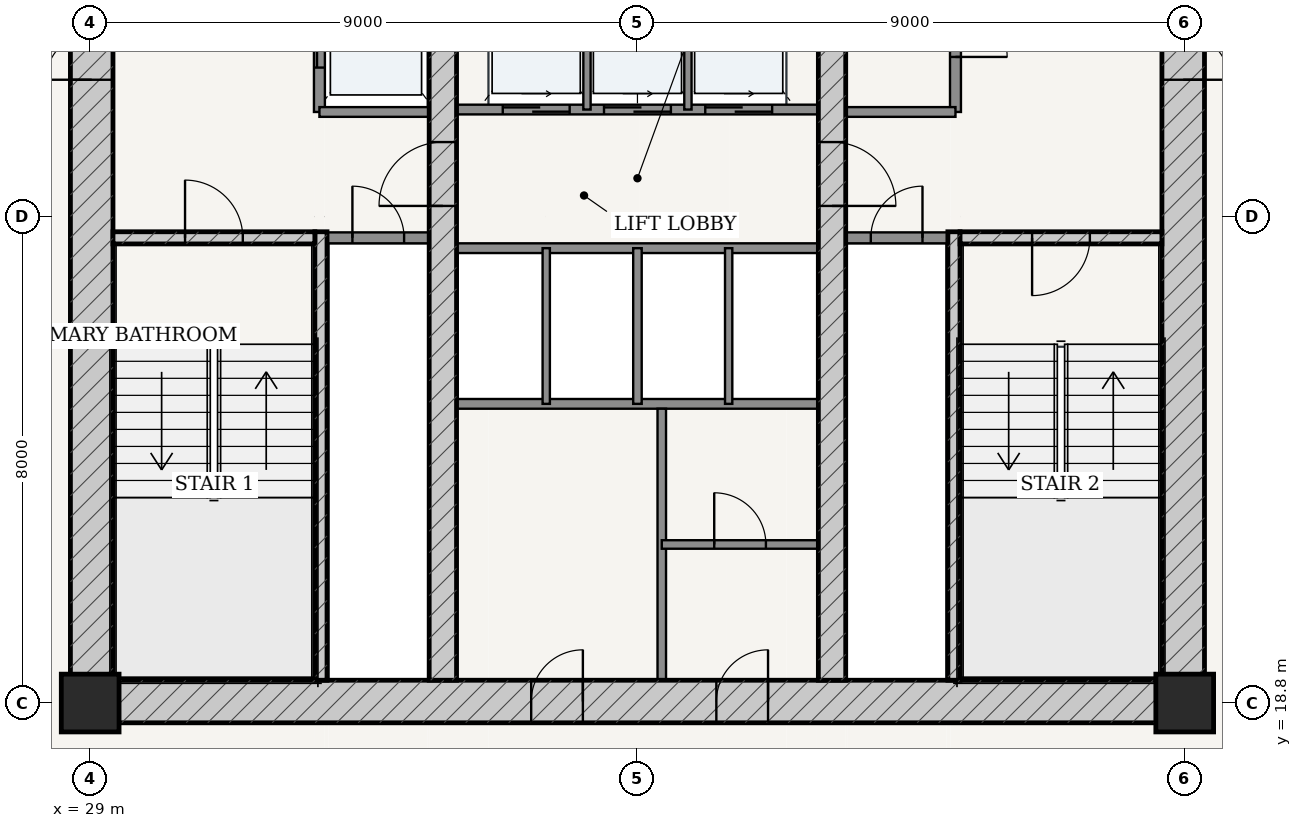
"""IFC4 building model, lengths in metres.
Left out: names, types, materials, properties, quantities, classifications, styles, units other than length and angle.
Written with IfcOpenShell. Run it as: python <this file> out.ifc"""

import sys

from ifc_helpers import new_model, si_unit, direction, frame, frame_2d, origin, origin_2d, place, context, subcontext, project, spatial, rectangle, extrude, source, transform, mapped, element, fill, save


model = new_model("IFC4")
c1 = context("Model", 3, precision=1e-05, world=origin(), true_north=direction((-0.2419218956, 0.970295726276)))
c2 = subcontext(c1, "Body", "Model", "MODEL_VIEW")
j1 = project(units=[si_unit("LENGTHUNIT", "METRE"), si_unit("PLANEANGLEUNIT", "RADIAN")], contexts=[c1])
p1 = place(None, origin())
s1 = spatial("IfcSite", under=j1, at=p1, CompositionType="ELEMENT")
p2 = place(p1, origin())
s2 = spatial("IfcBuilding", under=s1, at=p2, CompositionType="ELEMENT")
p3 = place(p2, frame((0.0, 0.0, 115.8)))
s3 = spatial("IfcBuildingStorey", under=s2, at=p3, CompositionType="ELEMENT", Elevation=115.8)
for number, where, z_axis, x_axis in (
    (1, (29.0, 18.8, 0.0), (0.0, 0.0, 1.0), (1.0, 0.0, 0.0)),
    (2, (47.0, 18.8, 0.0), (0.0, 0.0, 1.0), (1.0, 0.0, 0.0)),
):
    element("IfcColumn", number, at=place(p3, frame(where, z_axis=z_axis, x_axis=x_axis)), inside=s3, PredefinedType="COLUMN", context=c2, shape_type="SweptSolid", body=[
        extrude(rectangle(XDim=0.95, YDim=0.95, at=origin_2d()), origin(), (0.0, 0.0, 1.0), 3.6),
    ])
p4 = place(p3, frame((28.675, 18.825, 0.0), z_axis=(0.0, 0.0, 1.0), x_axis=(1.0, 0.0, 0.0)))
e3 = element("IfcWall", 3, at=p4, inside=s3, PredefinedType="SHEAR", context=c2, shape_type="SweptSolid", body=[
    extrude(rectangle(XDim=18.65, YDim=0.7, at=frame_2d((9.325, 0.0))), origin(), (0.0, 0.0, 1.0), 3.325),
])
p5 = place(p4, frame((7.577, 0.0, 0.0)))
e4 = element("IfcOpeningElement", 4, at=p5, cuts=e3, PredefinedType="OPENING", context=c2, shape_type="SweptSolid", body=[
    extrude(rectangle(XDim=0.85, YDim=2.1, at=frame_2d((0.425, 1.05))), frame((0.0, 0.36, 0.0), z_axis=(0.0, -1.0, 0.0), x_axis=(1.0, 0.0, 0.0)), (0.0, 0.0, 1.0), 0.72),
])
p6 = place(p4, frame((10.623, 0.0, 0.0)))
e5 = element("IfcOpeningElement", 5, at=p6, cuts=e3, PredefinedType="OPENING", context=c2, shape_type="SweptSolid", body=[
    extrude(rectangle(XDim=0.85, YDim=2.1, at=frame_2d((0.425, 1.05))), frame((0.0, 0.36, 0.0), z_axis=(0.0, -1.0, 0.0), x_axis=(1.0, 0.0, 0.0)), (0.0, 0.0, 1.0), 0.72),
])
p7 = place(p3, frame((29.025, 19.175, 0.0), z_axis=(0.0, 0.0, 1.0), x_axis=(0.0, 1.0, 0.0)))
e6 = element("IfcWall", 6, at=p7, inside=s3, PredefinedType="SHEAR", context=c2, shape_type="SweptSolid", body=[
    extrude(rectangle(XDim=15.25, YDim=0.7, at=frame_2d((7.625, 0.0))), origin(), (0.0, 0.0, 1.0), 3.325),
])
p8 = place(p7, frame((9.875, 0.0, 0.0)))
e7 = element("IfcOpeningElement", 7, at=p8, cuts=e6, PredefinedType="OPENING", context=c2, shape_type="SweptSolid", body=[
    extrude(rectangle(XDim=1.5, YDim=2.2, at=frame_2d((0.75, 1.1))), frame((0.0, 0.36, 0.0), z_axis=(0.0, -1.0, 0.0), x_axis=(1.0, 0.0, 0.0)), (0.0, 0.0, 1.0), 0.72),
])
p9 = place(p3, frame((46.975, 19.175, 0.0), z_axis=(0.0, 0.0, 1.0), x_axis=(0.0, 1.0, 0.0)))
e8 = element("IfcWall", 8, at=p9, inside=s3, PredefinedType="SHEAR", context=c2, shape_type="SweptSolid", body=[
    extrude(rectangle(XDim=15.25, YDim=0.7, at=frame_2d((7.625, 0.0))), origin(), (0.0, 0.0, 1.0), 3.325),
])
p10 = place(p9, frame((9.875, 0.0, 0.0)))
e9 = element("IfcOpeningElement", 9, at=p10, cuts=e8, PredefinedType="OPENING", context=c2, shape_type="SweptSolid", body=[
    extrude(rectangle(XDim=1.5, YDim=2.2, at=frame_2d((0.75, 1.1))), frame((0.0, 0.36, 0.0), z_axis=(0.0, -1.0, 0.0), x_axis=(1.0, 0.0, 0.0)), (0.0, 0.0, 1.0), 0.72),
])
p11 = place(p3, frame((32.795, 19.175, 0.0), z_axis=(0.0, 0.0, 1.0), x_axis=(0.0, 1.0, 0.0)))
e10 = element("IfcWall", 10, at=p11, inside=s3, PredefinedType="SOLIDWALL", context=c2, shape_type="SweptSolid", body=[
    extrude(rectangle(XDim=7.375, YDim=0.2, at=frame_2d((3.688, 0.0))), origin(), (0.0, 0.0, 1.0), 3.325),
])
p12 = place(p3, frame((29.375, 26.45, 0.0), z_axis=(0.0, 0.0, 1.0), x_axis=(1.0, 0.0, 0.0)))
e11 = element("IfcWall", 11, at=p12, inside=s3, PredefinedType="SOLIDWALL", context=c2, shape_type="SweptSolid", body=[
    extrude(rectangle(XDim=3.32, YDim=0.2, at=frame_2d((1.66, 0.0))), origin(), (0.0, 0.0, 1.0), 3.325),
])
p13 = place(p12, frame((1.185, 0.0, 0.0)))
e12 = element("IfcOpeningElement", 12, at=p13, cuts=e11, PredefinedType="OPENING", context=c2, shape_type="SweptSolid", body=[
    extrude(rectangle(XDim=0.95, YDim=2.15, at=frame_2d((0.475, 1.075))), frame((0.0, 0.11, 0.0), z_axis=(0.0, -1.0, 0.0), x_axis=(1.0, 0.0, 0.0)), (0.0, 0.0, 1.0), 0.22),
])
p14 = place(p3, frame((43.205, 19.175, 0.0), z_axis=(0.0, 0.0, 1.0), x_axis=(0.0, 1.0, 0.0)))
e13 = element("IfcWall", 13, at=p14, inside=s3, PredefinedType="SOLIDWALL", context=c2, shape_type="SweptSolid", body=[
    extrude(rectangle(XDim=7.375, YDim=0.2, at=frame_2d((3.688, 0.0))), origin(), (0.0, 0.0, 1.0), 3.325),
])
p15 = place(p3, frame((43.305, 26.45, 0.0), z_axis=(0.0, 0.0, 1.0), x_axis=(1.0, 0.0, 0.0)))
e14 = element("IfcWall", 14, at=p15, inside=s3, PredefinedType="SOLIDWALL", context=c2, shape_type="SweptSolid", body=[
    extrude(rectangle(XDim=3.32, YDim=0.2, at=frame_2d((1.66, 0.0))), origin(), (0.0, 0.0, 1.0), 3.325),
])
p16 = place(p15, frame((1.185, 0.0, 0.0)))
e15 = element("IfcOpeningElement", 15, at=p16, cuts=e14, PredefinedType="OPENING", context=c2, shape_type="SweptSolid", body=[
    extrude(rectangle(XDim=0.95, YDim=2.15, at=frame_2d((0.475, 1.075))), frame((0.0, 0.11, 0.0), z_axis=(0.0, -1.0, 0.0), x_axis=(1.0, 0.0, 0.0)), (0.0, 0.0, 1.0), 0.22),
])
p17 = place(p3, frame((34.8, 19.175, 0.0), z_axis=(0.0, 0.0, 1.0), x_axis=(0.0, 1.0, 0.0)))
e16 = element("IfcWall", 16, at=p17, inside=s3, PredefinedType="SHEAR", context=c2, shape_type="SweptSolid", body=[
    extrude(rectangle(XDim=15.25, YDim=0.45, at=frame_2d((7.625, 0.0))), origin(), (0.0, 0.0, 1.0), 3.325),
])
p18 = place(p17, frame((7.8, 0.0, 0.0)))
e17 = element("IfcOpeningElement", 17, at=p18, cuts=e16, PredefinedType="OPENING", context=c2, shape_type="SweptSolid", body=[
    extrude(rectangle(XDim=1.05, YDim=2.15, at=frame_2d((0.525, 1.075))), frame((0.0, 0.235, 0.0), z_axis=(0.0, -1.0, 0.0), x_axis=(1.0, 0.0, 0.0)), (0.0, 0.0, 1.0), 0.47),
])
p19 = place(p3, frame((41.2, 19.175, 0.0), z_axis=(0.0, 0.0, 1.0), x_axis=(0.0, 1.0, 0.0)))
e18 = element("IfcWall", 18, at=p19, inside=s3, PredefinedType="SHEAR", context=c2, shape_type="SweptSolid", body=[
    extrude(rectangle(XDim=15.25, YDim=0.45, at=frame_2d((7.625, 0.0))), origin(), (0.0, 0.0, 1.0), 3.325),
])
p20 = place(p19, frame((7.8, 0.0, 0.0)))
e19 = element("IfcOpeningElement", 19, at=p20, cuts=e18, PredefinedType="OPENING", context=c2, shape_type="SweptSolid", body=[
    extrude(rectangle(XDim=1.05, YDim=2.15, at=frame_2d((0.525, 1.075))), frame((0.0, 0.235, 0.0), z_axis=(0.0, -1.0, 0.0), x_axis=(1.0, 0.0, 0.0)), (0.0, 0.0, 1.0), 0.47),
])
p21 = place(p3, frame((32.9, 26.45, 0.0), z_axis=(0.0, 0.0, 1.0), x_axis=(1.0, 0.0, 0.0)))
e20 = element("IfcWall", 20, at=p21, inside=s3, PredefinedType="PARTITIONING", context=c2, shape_type="SweptSolid", body=[
    extrude(rectangle(XDim=1.675, YDim=0.18, at=frame_2d((0.837, 0.0))), origin(), (0.0, 0.0, 1.0), 3.325),
])
p22 = place(p21, frame((0.413, 0.0, 0.0)))
e21 = element("IfcOpeningElement", 21, at=p22, cuts=e20, PredefinedType="OPENING", context=c2, shape_type="SweptSolid", body=[
    extrude(rectangle(XDim=0.85, YDim=2.1, at=frame_2d((0.425, 1.05))), frame((0.0, 0.1, 0.0), z_axis=(0.0, -1.0, 0.0), x_axis=(1.0, 0.0, 0.0)), (0.0, 0.0, 1.0), 0.2),
])
p23 = place(p3, frame((41.425, 26.45, 0.0), z_axis=(0.0, 0.0, 1.0), x_axis=(1.0, 0.0, 0.0)))
e22 = element("IfcWall", 22, at=p23, inside=s3, PredefinedType="PARTITIONING", context=c2, shape_type="SweptSolid", body=[
    extrude(rectangle(XDim=1.675, YDim=0.18, at=frame_2d((0.837, 0.0))), origin(), (0.0, 0.0, 1.0), 3.325),
])
p24 = place(p23, frame((0.413, 0.0, 0.0)))
e23 = element("IfcOpeningElement", 23, at=p24, cuts=e22, PredefinedType="OPENING", context=c2, shape_type="SweptSolid", body=[
    extrude(rectangle(XDim=0.85, YDim=2.1, at=frame_2d((0.425, 1.05))), frame((0.0, 0.1, 0.0), z_axis=(0.0, -1.0, 0.0), x_axis=(1.0, 0.0, 0.0)), (0.0, 0.0, 1.0), 0.2),
])
p25 = place(p3, frame((32.77, 28.52, 0.0), z_axis=(0.0, 0.0, 1.0), x_axis=(0.0, 1.0, 0.0)))
e24 = element("IfcWall", 24, at=p25, inside=s3, PredefinedType="PARTITIONING", context=c2, shape_type="SweptSolid", body=[
    extrude(rectangle(XDim=5.905, YDim=0.18, at=frame_2d((2.953, 0.0))), origin(), (0.0, 0.0, 1.0), 3.325),
])
p26 = place(p25, frame((3.655, 0.0, 0.0)))
e25 = element("IfcOpeningElement", 25, at=p26, cuts=e24, PredefinedType="OPENING", context=c2, shape_type="SweptSolid", body=[
    extrude(rectangle(XDim=1.15, YDim=2.2, at=frame_2d((0.575, 1.1))), frame((0.0, 0.1, 0.0), z_axis=(0.0, -1.0, 0.0), x_axis=(1.0, 0.0, 0.0)), (0.0, 0.0, 1.0), 0.2),
])
p27 = place(p25, frame((0.73, 0.0, 0.0)))
e26 = element("IfcOpeningElement", 26, at=p27, cuts=e24, PredefinedType="OPENING", context=c2, shape_type="SweptSolid", body=[
    extrude(rectangle(XDim=1.2, YDim=2.25, at=frame_2d((0.6, 1.125))), frame((0.0, 0.1, 0.0), z_axis=(0.0, -1.0, 0.0), x_axis=(1.0, 0.0, 0.0)), (0.0, 0.0, 1.0), 0.2),
])
p28 = place(p3, frame((32.77, 28.52, 0.0), z_axis=(0.0, 0.0, 1.0), x_axis=(1.0, 0.0, 0.0)))
e27 = element("IfcWall", 27, at=p28, inside=s3, PredefinedType="PARTITIONING", context=c2, shape_type="SweptSolid", body=[
    extrude(rectangle(XDim=1.805, YDim=0.16, at=frame_2d((0.902, 0.0))), origin(), (0.0, 0.0, 1.0), 3.325),
])
p29 = place(p3, frame((43.23, 28.52, 0.0), z_axis=(0.0, 0.0, 1.0), x_axis=(0.0, 1.0, 0.0)))
e28 = element("IfcWall", 28, at=p29, inside=s3, PredefinedType="PARTITIONING", context=c2, shape_type="SweptSolid", body=[
    extrude(rectangle(XDim=5.905, YDim=0.18, at=frame_2d((2.953, 0.0))), origin(), (0.0, 0.0, 1.0), 3.325),
])
p30 = place(p29, frame((0.905, 0.0, 0.0)))
e29 = element("IfcOpeningElement", 29, at=p30, cuts=e28, PredefinedType="OPENING", context=c2, shape_type="SweptSolid", body=[
    extrude(rectangle(XDim=0.85, YDim=2.1, at=frame_2d((0.425, 1.05))), frame((0.0, 0.1, 0.0), z_axis=(0.0, -1.0, 0.0), x_axis=(1.0, 0.0, 0.0)), (0.0, 0.0, 1.0), 0.2),
])
p31 = place(p29, frame((3.655, 0.0, 0.0)))
e30 = element("IfcOpeningElement", 30, at=p31, cuts=e28, PredefinedType="OPENING", context=c2, shape_type="SweptSolid", body=[
    extrude(rectangle(XDim=1.15, YDim=2.2, at=frame_2d((0.575, 1.1))), frame((0.0, 0.1, 0.0), z_axis=(0.0, -1.0, 0.0), x_axis=(1.0, 0.0, 0.0)), (0.0, 0.0, 1.0), 0.2),
])
p32 = place(p3, frame((41.425, 28.52, 0.0), z_axis=(0.0, 0.0, 1.0), x_axis=(1.0, 0.0, 0.0)))
e31 = element("IfcWall", 31, at=p32, inside=s3, PredefinedType="PARTITIONING", context=c2, shape_type="SweptSolid", body=[
    extrude(rectangle(XDim=1.805, YDim=0.16, at=frame_2d((0.902, 0.0))), origin(), (0.0, 0.0, 1.0), 3.325),
])
p33 = place(p3, frame((35.025, 28.56, 0.0), z_axis=(0.0, 0.0, 1.0), x_axis=(1.0, 0.0, 0.0)))
e32 = element("IfcWall", 32, at=p33, inside=s3, PredefinedType="PARTITIONING", context=c2, shape_type="SweptSolid", body=[
    extrude(rectangle(XDim=5.95, YDim=0.16, at=frame_2d((2.975, 0.0))), origin(), (0.0, 0.0, 1.0), 3.325),
])
p34 = place(p33, frame((0.76, 0.0, 0.0)))
e33 = element("IfcOpeningElement", 33, at=p34, cuts=e32, PredefinedType="OPENING", context=c2, shape_type="SweptSolid", body=[
    extrude(rectangle(XDim=1.1, YDim=2.2, at=frame_2d((0.55, 1.1))), frame((0.0, 0.09, 0.0), z_axis=(0.0, -1.0, 0.0), x_axis=(1.0, 0.0, 0.0)), (0.0, 0.0, 1.0), 0.18),
])
p35 = place(p33, frame((2.425, 0.0, 0.0)))
e34 = element("IfcOpeningElement", 34, at=p35, cuts=e32, PredefinedType="OPENING", context=c2, shape_type="SweptSolid", body=[
    extrude(rectangle(XDim=1.1, YDim=2.2, at=frame_2d((0.55, 1.1))), frame((0.0, 0.09, 0.0), z_axis=(0.0, -1.0, 0.0), x_axis=(1.0, 0.0, 0.0)), (0.0, 0.0, 1.0), 0.18),
])
p36 = place(p33, frame((4.09, 0.0, 0.0)))
e35 = element("IfcOpeningElement", 35, at=p36, cuts=e32, PredefinedType="OPENING", context=c2, shape_type="SweptSolid", body=[
    extrude(rectangle(XDim=1.1, YDim=2.2, at=frame_2d((0.55, 1.1))), frame((0.0, 0.09, 0.0), z_axis=(0.0, -1.0, 0.0), x_axis=(1.0, 0.0, 0.0)), (0.0, 0.0, 1.0), 0.18),
])
for number, where, z_axis, x_axis in (
    (36, (37.17, 28.56, 0.0), (0.0, 0.0, 1.0), (0.0, 1.0, 0.0)),
    (37, (38.83, 28.56, 0.0), (0.0, 0.0, 1.0), (0.0, 1.0, 0.0)),
):
    element("IfcWall", number, at=place(p3, frame(where, z_axis=z_axis, x_axis=x_axis)), inside=s3, PredefinedType="PARTITIONING", context=c2, shape_type="SweptSolid", body=[
        extrude(rectangle(XDim=2.56, YDim=0.12, at=frame_2d((1.28, 0.0))), origin(), (0.0, 0.0, 1.0), 3.325),
    ])
for number, where, z_axis, x_axis in (
    (38, (35.025, 26.28, 0.0), (0.0, 0.0, 1.0), (1.0, 0.0, 0.0)),
    (39, (35.025, 23.72, 0.0), (0.0, 0.0, 1.0), (1.0, 0.0, 0.0)),
):
    element("IfcWall", number, at=place(p3, frame(where, z_axis=z_axis, x_axis=x_axis)), inside=s3, PredefinedType="PARTITIONING", context=c2, shape_type="SweptSolid", body=[
        extrude(rectangle(XDim=5.95, YDim=0.16, at=frame_2d((2.975, 0.0))), origin(), (0.0, 0.0, 1.0), 3.325),
    ])
p37 = place(p3, frame((36.5, 23.72, 0.0), z_axis=(0.0, 0.0, 1.0), x_axis=(0.0, 1.0, 0.0)))
e40 = element("IfcWall", 40, at=p37, inside=s3, PredefinedType="PARTITIONING", context=c2, shape_type="SweptSolid", body=[
    extrude(rectangle(XDim=2.56, YDim=0.12, at=frame_2d((1.28, 0.0))), origin(), (0.0, 0.0, 1.0), 3.325),
])
p38 = place(p3, frame((38.0, 23.72, 0.0), z_axis=(0.0, 0.0, 1.0), x_axis=(0.0, 1.0, 0.0)))
e41 = element("IfcWall", 41, at=p38, inside=s3, PredefinedType="PARTITIONING", context=c2, shape_type="SweptSolid", body=[
    extrude(rectangle(XDim=2.56, YDim=0.14, at=frame_2d((1.28, 0.0))), origin(), (0.0, 0.0, 1.0), 3.325),
])
p39 = place(p3, frame((39.5, 23.72, 0.0), z_axis=(0.0, 0.0, 1.0), x_axis=(0.0, 1.0, 0.0)))
e42 = element("IfcWall", 42, at=p39, inside=s3, PredefinedType="PARTITIONING", context=c2, shape_type="SweptSolid", body=[
    extrude(rectangle(XDim=2.56, YDim=0.12, at=frame_2d((1.28, 0.0))), origin(), (0.0, 0.0, 1.0), 3.325),
])
p40 = place(p3, frame((38.4, 19.175, 0.0), z_axis=(0.0, 0.0, 1.0), x_axis=(0.0, 1.0, 0.0)))
e43 = element("IfcWall", 43, at=p40, inside=s3, PredefinedType="PARTITIONING", context=c2, shape_type="SweptSolid", body=[
    extrude(rectangle(XDim=4.465, YDim=0.14, at=frame_2d((2.232, 0.0))), origin(), (0.0, 0.0, 1.0), 3.325),
])
p41 = place(p3, frame((38.4, 21.407, 0.0), z_axis=(0.0, 0.0, 1.0), x_axis=(1.0, 0.0, 0.0)))
e44 = element("IfcWall", 44, at=p41, inside=s3, PredefinedType="PARTITIONING", context=c2, shape_type="SweptSolid", body=[
    extrude(rectangle(XDim=2.575, YDim=0.14, at=frame_2d((1.288, 0.0))), origin(), (0.0, 0.0, 1.0), 3.325),
])
p42 = place(p41, frame((0.863, 0.0, 0.0)))
e45 = element("IfcOpeningElement", 45, at=p42, cuts=e44, PredefinedType="OPENING", context=c2, shape_type="SweptSolid", body=[
    extrude(rectangle(XDim=0.85, YDim=2.1, at=frame_2d((0.425, 1.05))), frame((0.0, 0.08, 0.0), z_axis=(0.0, -1.0, 0.0), x_axis=(1.0, 0.0, 0.0)), (0.0, 0.0, 1.0), 0.16),
])
m1 = source(origin(), c2, "Body", "SweptSolid", [
    extrude(rectangle(XDim=1.5, YDim=2.2, at=frame_2d((0.75, 1.1))), frame((0.0, 0.025, 0.0), z_axis=(0.0, -1.0, 0.0), x_axis=(1.0, 0.0, 0.0)), (0.0, 0.0, 1.0), 0.05),
])
p43 = place(p8, origin())
e46 = element("IfcDoor", 46, at=p43, inside=s3, OperationType="DOUBLE_DOOR_SINGLE_SWING", PredefinedType="DOOR", context=c2, shape_type="MappedRepresentation", body=[
    mapped(m1, transform((0.0, 0.0, 0.0), scale=1.0)),
])
fill(e7, e46)
p44 = place(p10, frame((1.5, 0.0, 0.0), z_axis=(0.0, 0.0, 1.0), x_axis=(-1.0, 0.0, 0.0)))
e47 = element("IfcDoor", 47, at=p44, inside=s3, OperationType="DOUBLE_DOOR_SINGLE_SWING", PredefinedType="DOOR", context=c2, shape_type="MappedRepresentation", body=[
    mapped(m1, transform((0.0, 0.0, 0.0), scale=1.0)),
])
fill(e9, e47)
m2 = source(origin(), c2, "Body", "SweptSolid", [
    extrude(rectangle(XDim=1.05, YDim=2.15, at=frame_2d((0.525, 1.075))), frame((0.0, 0.025, 0.0), z_axis=(0.0, -1.0, 0.0), x_axis=(1.0, 0.0, 0.0)), (0.0, 0.0, 1.0), 0.05),
])
p45 = place(p18, origin())
e48 = element("IfcDoor", 48, at=p45, inside=s3, OperationType="SINGLE_SWING_LEFT", PredefinedType="DOOR", context=c2, shape_type="MappedRepresentation", body=[
    mapped(m2, transform((0.0, 0.0, 0.0), scale=1.0)),
])
fill(e17, e48)
p46 = place(p20, frame((1.05, 0.0, 0.0), z_axis=(0.0, 0.0, 1.0), x_axis=(-1.0, 0.0, 0.0)))
e49 = element("IfcDoor", 49, at=p46, inside=s3, OperationType="SINGLE_SWING_RIGHT", PredefinedType="DOOR", context=c2, shape_type="MappedRepresentation", body=[
    mapped(m2, transform((0.0, 0.0, 0.0), scale=1.0)),
])
fill(e19, e49)
m3 = source(origin(), c2, "Body", "SweptSolid", [
    extrude(rectangle(XDim=0.95, YDim=2.15, at=frame_2d((0.475, 1.075))), frame((0.0, 0.025, 0.0), z_axis=(0.0, -1.0, 0.0), x_axis=(1.0, 0.0, 0.0)), (0.0, 0.0, 1.0), 0.05),
])
p47 = place(p13, origin())
e50 = element("IfcDoor", 50, at=p47, inside=s3, OperationType="SINGLE_SWING_LEFT", PredefinedType="DOOR", context=c2, shape_type="MappedRepresentation", body=[
    mapped(m3, transform((0.0, 0.0, 0.0), scale=1.0)),
])
fill(e12, e50)
p48 = place(p16, frame((0.95, 0.0, 0.0), z_axis=(0.0, 0.0, 1.0), x_axis=(-1.0, 0.0, 0.0)))
e51 = element("IfcDoor", 51, at=p48, inside=s3, OperationType="SINGLE_SWING_RIGHT", PredefinedType="DOOR", context=c2, shape_type="MappedRepresentation", body=[
    mapped(m3, transform((0.0, 0.0, 0.0), scale=1.0)),
])
fill(e15, e51)
m4 = source(origin(), c2, "Body", "SweptSolid", [
    extrude(rectangle(XDim=0.85, YDim=2.1, at=frame_2d((0.425, 1.05))), frame((0.0, 0.025, 0.0), z_axis=(0.0, -1.0, 0.0), x_axis=(1.0, 0.0, 0.0)), (0.0, 0.0, 1.0), 0.05),
])
p49 = place(p22, origin())
e52 = element("IfcDoor", 52, at=p49, inside=s3, OperationType="SINGLE_SWING_LEFT", PredefinedType="DOOR", context=c2, shape_type="MappedRepresentation", body=[
    mapped(m4, transform((0.0, 0.0, 0.0), scale=1.0)),
])
fill(e21, e52)
p50 = place(p24, origin())
e53 = element("IfcDoor", 53, at=p50, inside=s3, OperationType="SINGLE_SWING_RIGHT", PredefinedType="DOOR", context=c2, shape_type="MappedRepresentation", body=[
    mapped(m4, transform((0.0, 0.0, 0.0), scale=1.0)),
])
fill(e23, e53)
p51 = place(p30, frame((0.85, 0.0, 0.0), z_axis=(0.0, 0.0, 1.0), x_axis=(-1.0, 0.0, 0.0)))
e54 = element("IfcDoor", 54, at=p51, inside=s3, OperationType="SINGLE_SWING_RIGHT", PredefinedType="DOOR", context=c2, shape_type="MappedRepresentation", body=[
    mapped(m4, transform((0.0, 0.0, 0.0), scale=1.0)),
])
fill(e29, e54)
p52 = place(p5, origin())
e55 = element("IfcDoor", 55, at=p52, inside=s3, OperationType="SINGLE_SWING_RIGHT", PredefinedType="DOOR", context=c2, shape_type="MappedRepresentation", body=[
    mapped(m4, transform((0.0, 0.0, 0.0), scale=1.0)),
])
fill(e4, e55)
p53 = place(p6, origin())
e56 = element("IfcDoor", 56, at=p53, inside=s3, OperationType="SINGLE_SWING_RIGHT", PredefinedType="DOOR", context=c2, shape_type="MappedRepresentation", body=[
    mapped(m4, transform((0.0, 0.0, 0.0), scale=1.0)),
])
fill(e5, e56)
p54 = place(p42, origin())
e57 = element("IfcDoor", 57, at=p54, inside=s3, OperationType="SINGLE_SWING_LEFT", PredefinedType="DOOR", context=c2, shape_type="MappedRepresentation", body=[
    mapped(m4, transform((0.0, 0.0, 0.0), scale=1.0)),
])
fill(e45, e57)
m5 = source(origin(), c2, "Body", "SweptSolid", [
    extrude(rectangle(XDim=1.2, YDim=2.25, at=frame_2d((0.6, 1.125))), frame((0.0, 0.025, 0.0), z_axis=(0.0, -1.0, 0.0), x_axis=(1.0, 0.0, 0.0)), (0.0, 0.0, 1.0), 0.05),
])
p55 = place(p27, origin())
e58 = element("IfcDoor", 58, at=p55, inside=s3, OperationType="DOUBLE_DOOR_SLIDING", PredefinedType="DOOR", context=c2, shape_type="MappedRepresentation", body=[
    mapped(m5, transform((0.0, 0.0, 0.0), scale=1.0)),
])
fill(e26, e58)
m6 = source(origin(), c2, "Body", "SweptSolid", [
    extrude(rectangle(XDim=1.1, YDim=2.2, at=frame_2d((0.55, 1.1))), frame((0.0, 0.025, 0.0), z_axis=(0.0, -1.0, 0.0), x_axis=(1.0, 0.0, 0.0)), (0.0, 0.0, 1.0), 0.05),
])
p56 = place(p34, origin())
e59 = element("IfcDoor", 59, at=p56, inside=s3, OperationType="DOUBLE_DOOR_SLIDING", PredefinedType="DOOR", context=c2, shape_type="MappedRepresentation", body=[
    mapped(m6, transform((0.0, 0.0, 0.0), scale=1.0)),
])
fill(e33, e59)
p57 = place(p35, origin())
e60 = element("IfcDoor", 60, at=p57, inside=s3, OperationType="DOUBLE_DOOR_SLIDING", PredefinedType="DOOR", context=c2, shape_type="MappedRepresentation", body=[
    mapped(m6, transform((0.0, 0.0, 0.0), scale=1.0)),
])
fill(e34, e60)
p58 = place(p36, origin())
e61 = element("IfcDoor", 61, at=p58, inside=s3, OperationType="DOUBLE_DOOR_SLIDING", PredefinedType="DOOR", context=c2, shape_type="MappedRepresentation", body=[
    mapped(m6, transform((0.0, 0.0, 0.0), scale=1.0)),
])
fill(e35, e61)
save(model, sys.argv[1])
